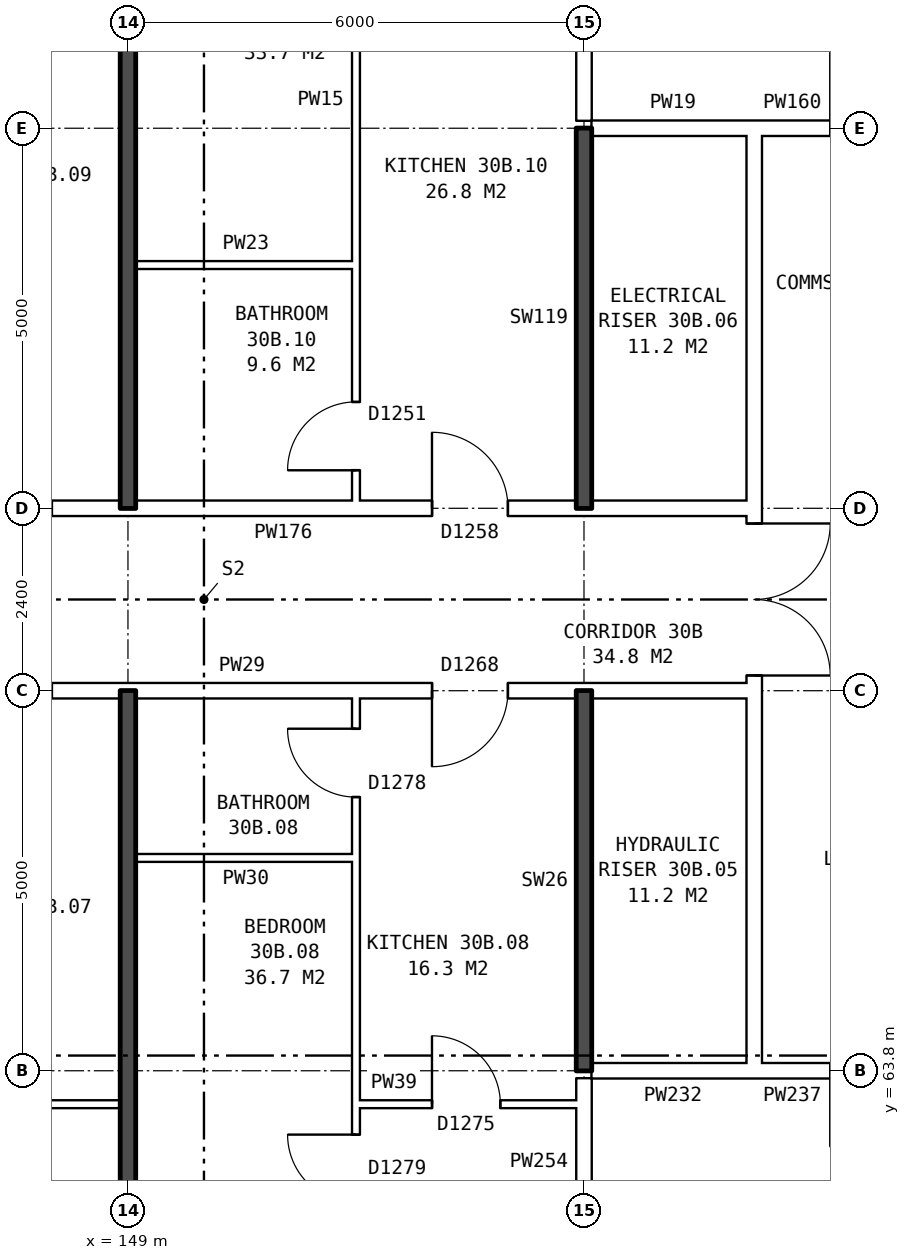
"""IFC4 building model, lengths in metres.
Left out: names, types, materials, properties, quantities, classifications, styles, units other than length and angle.
Written with IfcOpenShell. Run it as: python <this file> out.ifc"""

import sys

from ifc_helpers import new_model, si_unit, direction, frame, frame_2d, origin, place, context, subcontext, project, spatial, rectangle, extrude, element, fill, save


model = new_model("IFC4")
c1 = context("Model", 3, precision=1e-05, world=origin(), true_north=direction((0.0, 1.0)))
c2 = subcontext(c1, "Body", "Model", "MODEL_VIEW")
j1 = project(units=[si_unit("LENGTHUNIT", "METRE"), si_unit("PLANEANGLEUNIT", "RADIAN")], contexts=[c1])
p1 = place(None, origin())
s1 = spatial("IfcSite", under=j1, at=p1, CompositionType="ELEMENT")
p2 = place(p1, origin())
s2 = spatial("IfcBuilding", under=s1, at=p2, CompositionType="ELEMENT")
p3 = place(p2, frame((0.0, 0.0, 108.8)))
s3 = spatial("IfcBuildingStorey", under=s2, at=p3, CompositionType="ELEMENT", Elevation=108.8)
p4 = place(p3, frame((157.24, 63.9, 0.0), z_axis=(0.0, 0.0, 1.0), x_axis=(0.0, 1.0, 0.0)))
e1 = element("IfcWall", 1, at=p4, inside=s3, PredefinedType="PARTITIONING", context=c2, shape_type="SweptSolid", body=[
    extrude(rectangle(XDim=12.2, YDim=0.2, at=frame_2d((6.1, 0.0))), origin(), (0.0, 0.0, 1.0), 2.85),
])
p5 = place(p4, frame((5.1, 0.0, 0.0)))
e2 = element("IfcOpeningElement", 2, at=p5, cuts=e1, PredefinedType="OPENING", context=c2, shape_type="SweptSolid", body=[
    extrude(rectangle(XDim=2.0, YDim=2.1, at=frame_2d((1.0, 1.05))), frame((0.0, 0.11, 0.0), z_axis=(0.0, -1.0, 0.0), x_axis=(1.0, 0.0, 0.0)), (0.0, 0.0, 1.0), 0.22),
])
p6 = place(p3, frame((146.0, 63.36, 0.0), z_axis=(0.0, 0.0, 1.0), x_axis=(1.0, 0.0, 0.0)))
e3 = element("IfcWall", 3, at=p6, inside=s3, PredefinedType="PARTITIONING", context=c2, shape_type="SweptSolid", body=[
    extrude(rectangle(XDim=2.9, YDim=0.1, at=frame_2d((1.45, 0.0))), origin(), (0.0, 0.0, 1.0), 2.85),
])
p7 = place(p6, frame((1.0, 0.0, 0.0)))
e4 = element("IfcOpeningElement", 4, at=p7, cuts=e3, PredefinedType="OPENING", context=c2, shape_type="SweptSolid", body=[
    extrude(rectangle(XDim=0.9, YDim=2.1, at=frame_2d((0.45, 1.05))), frame((0.0, 0.06, 0.0), z_axis=(0.0, -1.0, 0.0), x_axis=(1.0, 0.0, 0.0)), (0.0, 0.0, 1.0), 0.12),
])
p8 = place(p3, frame((152.0, 63.36, 0.0), z_axis=(0.0, 0.0, 1.0), x_axis=(1.0, 0.0, 0.0)))
e5 = element("IfcWall", 5, at=p8, inside=s3, PredefinedType="PARTITIONING", context=c2, shape_type="SweptSolid", body=[
    extrude(rectangle(XDim=2.9, YDim=0.1, at=frame_2d((1.45, 0.0))), origin(), (0.0, 0.0, 1.0), 2.85),
])
p9 = place(p8, frame((1.0, 0.0, 0.0)))
e6 = element("IfcOpeningElement", 6, at=p9, cuts=e5, PredefinedType="OPENING", context=c2, shape_type="SweptSolid", body=[
    extrude(rectangle(XDim=0.9, YDim=2.1, at=frame_2d((0.45, 1.05))), frame((0.0, 0.06, 0.0), z_axis=(0.0, -1.0, 0.0), x_axis=(1.0, 0.0, 0.0)), (0.0, 0.0, 1.0), 0.12),
])
p10 = place(p3, frame((155.1, 63.8, 0.0), z_axis=(0.0, 0.0, 1.0), x_axis=(1.0, 0.0, 0.0)))
e7 = element("IfcWall", 7, at=p10, inside=s3, PredefinedType="PARTITIONING", context=c2, shape_type="SweptSolid", body=[
    extrude(rectangle(XDim=2.14, YDim=0.2, at=frame_2d((1.07, 0.0))), origin(), (0.0, 0.0, 1.0), 2.85),
])
p11 = place(p3, frame((157.24, 63.8, 0.0), z_axis=(0.0, 0.0, 1.0), x_axis=(1.0, 0.0, 0.0)))
e8 = element("IfcWall", 8, at=p11, inside=s3, PredefinedType="PARTITIONING", context=c2, shape_type="SweptSolid", body=[
    extrude(rectangle(XDim=3.0, YDim=0.2, at=frame_2d((1.5, 0.0))), origin(), (0.0, 0.0, 1.0), 2.85),
])
p12 = place(p11, frame((1.0, 0.0, 0.0)))
e9 = element("IfcOpeningElement", 9, at=p12, cuts=e8, PredefinedType="OPENING", context=c2, shape_type="SweptSolid", body=[
    extrude(rectangle(XDim=1.0, YDim=2.1, at=frame_2d((0.5, 1.05))), frame((0.0, 0.11, 0.0), z_axis=(0.0, -1.0, 0.0), x_axis=(1.0, 0.0, 0.0)), (0.0, 0.0, 1.0), 0.22),
])
p13 = place(p3, frame((149.1, 66.6, 0.0), z_axis=(0.0, 0.0, 1.0), x_axis=(1.0, 0.0, 0.0)))
e10 = element("IfcWall", 10, at=p13, inside=s3, PredefinedType="PARTITIONING", context=c2, shape_type="SweptSolid", body=[
    extrude(rectangle(XDim=2.9, YDim=0.1, at=frame_2d((1.45, 0.0))), origin(), (0.0, 0.0, 1.0), 2.85),
])
p14 = place(p3, frame((142.76, 68.8, 0.0), z_axis=(0.0, 0.0, 1.0), x_axis=(1.0, 0.0, 0.0)))
e11 = element("IfcWall", 11, at=p14, inside=s3, PredefinedType="PARTITIONING", context=c2, shape_type="SweptSolid", body=[
    extrude(rectangle(XDim=14.48, YDim=0.2, at=frame_2d((7.24, 0.0))), origin(), (0.0, 0.0, 1.0), 2.85),
])
p15 = place(p14, frame((4.24, 0.0, 0.0)))
e12 = element("IfcOpeningElement", 12, at=p15, cuts=e11, PredefinedType="OPENING", context=c2, shape_type="SweptSolid", body=[
    extrude(rectangle(XDim=1.0, YDim=2.1, at=frame_2d((0.5, 1.05))), frame((0.0, 0.11, 0.0), z_axis=(0.0, -1.0, 0.0), x_axis=(1.0, 0.0, 0.0)), (0.0, 0.0, 1.0), 0.22),
])
p16 = place(p14, frame((10.24, 0.0, 0.0)))
e13 = element("IfcOpeningElement", 13, at=p16, cuts=e11, PredefinedType="OPENING", context=c2, shape_type="SweptSolid", body=[
    extrude(rectangle(XDim=1.0, YDim=2.1, at=frame_2d((0.5, 1.05))), frame((0.0, 0.11, 0.0), z_axis=(0.0, -1.0, 0.0), x_axis=(1.0, 0.0, 0.0)), (0.0, 0.0, 1.0), 0.22),
])
p17 = place(p3, frame((142.76, 71.2, 0.0), z_axis=(0.0, 0.0, 1.0), x_axis=(1.0, 0.0, 0.0)))
e14 = element("IfcWall", 14, at=p17, inside=s3, PredefinedType="PARTITIONING", context=c2, shape_type="SweptSolid", body=[
    extrude(rectangle(XDim=14.48, YDim=0.2, at=frame_2d((7.24, 0.0))), origin(), (0.0, 0.0, 1.0), 2.85),
])
p18 = place(p17, frame((4.24, 0.0, 0.0)))
e15 = element("IfcOpeningElement", 15, at=p18, cuts=e14, PredefinedType="OPENING", context=c2, shape_type="SweptSolid", body=[
    extrude(rectangle(XDim=1.0, YDim=2.1, at=frame_2d((0.5, 1.05))), frame((0.0, 0.11, 0.0), z_axis=(0.0, -1.0, 0.0), x_axis=(1.0, 0.0, 0.0)), (0.0, 0.0, 1.0), 0.22),
])
p19 = place(p17, frame((10.24, 0.0, 0.0)))
e16 = element("IfcOpeningElement", 16, at=p19, cuts=e14, PredefinedType="OPENING", context=c2, shape_type="SweptSolid", body=[
    extrude(rectangle(XDim=1.0, YDim=2.1, at=frame_2d((0.5, 1.05))), frame((0.0, 0.11, 0.0), z_axis=(0.0, -1.0, 0.0), x_axis=(1.0, 0.0, 0.0)), (0.0, 0.0, 1.0), 0.22),
])
p20 = place(p3, frame((149.1, 74.4, 0.0), z_axis=(0.0, 0.0, 1.0), x_axis=(1.0, 0.0, 0.0)))
e17 = element("IfcWall", 17, at=p20, inside=s3, PredefinedType="PARTITIONING", context=c2, shape_type="SweptSolid", body=[
    extrude(rectangle(XDim=2.9, YDim=0.1, at=frame_2d((1.45, 0.0))), origin(), (0.0, 0.0, 1.0), 2.85),
])
p21 = place(p3, frame((155.1, 76.2, 0.0), z_axis=(0.0, 0.0, 1.0), x_axis=(1.0, 0.0, 0.0)))
e18 = element("IfcWall", 18, at=p21, inside=s3, PredefinedType="PARTITIONING", context=c2, shape_type="SweptSolid", body=[
    extrude(rectangle(XDim=2.14, YDim=0.2, at=frame_2d((1.07, 0.0))), origin(), (0.0, 0.0, 1.0), 2.85),
])
p22 = place(p3, frame((157.24, 76.2, 0.0), z_axis=(0.0, 0.0, 1.0), x_axis=(1.0, 0.0, 0.0)))
e19 = element("IfcWall", 19, at=p22, inside=s3, PredefinedType="PARTITIONING", context=c2, shape_type="SweptSolid", body=[
    extrude(rectangle(XDim=3.0, YDim=0.2, at=frame_2d((1.5, 0.0))), origin(), (0.0, 0.0, 1.0), 2.85),
])
p23 = place(p22, frame((1.0, 0.0, 0.0)))
e20 = element("IfcOpeningElement", 20, at=p23, cuts=e19, PredefinedType="OPENING", context=c2, shape_type="SweptSolid", body=[
    extrude(rectangle(XDim=1.0, YDim=2.1, at=frame_2d((0.5, 1.05))), frame((0.0, 0.11, 0.0), z_axis=(0.0, -1.0, 0.0), x_axis=(1.0, 0.0, 0.0)), (0.0, 0.0, 1.0), 0.22),
])
for number, where, z_axis, x_axis in (
    (21, (149.0, 54.36, 0.0), (0.0, 0.0, 1.0), (0.0, 1.0, 0.0)),
    (22, (149.0, 71.2, 0.0), (0.0, 0.0, 1.0), (0.0, 1.0, 0.0)),
):
    element("IfcWall", number, at=place(p3, frame(where, z_axis=z_axis, x_axis=x_axis)), inside=s3, PredefinedType="SOLIDWALL", context=c2, shape_type="SweptSolid", body=[
        extrude(rectangle(XDim=14.44, YDim=0.2, at=frame_2d((7.22, 0.0))), origin(), (0.0, 0.0, 1.0), 2.85),
    ])
p24 = place(p3, frame((152.0, 54.36, 0.0), z_axis=(0.0, 0.0, 1.0), x_axis=(0.0, 1.0, 0.0)))
e23 = element("IfcWall", 23, at=p24, inside=s3, PredefinedType="PARTITIONING", context=c2, shape_type="SweptSolid", body=[
    extrude(rectangle(XDim=14.34, YDim=0.1, at=frame_2d((7.17, 0.0))), origin(), (0.0, 0.0, 1.0), 2.85),
])
p25 = place(p24, frame((7.7, 0.0, 0.0)))
e24 = element("IfcOpeningElement", 24, at=p25, cuts=e23, PredefinedType="OPENING", context=c2, shape_type="SweptSolid", body=[
    extrude(rectangle(XDim=0.9, YDim=2.1, at=frame_2d((0.45, 1.05))), frame((0.0, 0.06, 0.0), z_axis=(0.0, -1.0, 0.0), x_axis=(1.0, 0.0, 0.0)), (0.0, 0.0, 1.0), 0.12),
])
p26 = place(p24, frame((13.04, 0.0, 0.0)))
e25 = element("IfcOpeningElement", 25, at=p26, cuts=e23, PredefinedType="OPENING", context=c2, shape_type="SweptSolid", body=[
    extrude(rectangle(XDim=0.9, YDim=2.1, at=frame_2d((0.45, 1.05))), frame((0.0, 0.06, 0.0), z_axis=(0.0, -1.0, 0.0), x_axis=(1.0, 0.0, 0.0)), (0.0, 0.0, 1.0), 0.12),
])
p27 = place(p3, frame((152.0, 71.3, 0.0), z_axis=(0.0, 0.0, 1.0), x_axis=(0.0, 1.0, 0.0)))
e26 = element("IfcWall", 26, at=p27, inside=s3, PredefinedType="PARTITIONING", context=c2, shape_type="SweptSolid", body=[
    extrude(rectangle(XDim=14.34, YDim=0.1, at=frame_2d((7.17, 0.0))), origin(), (0.0, 0.0, 1.0), 2.85),
])
p28 = place(p27, frame((9.24, 0.0, 0.0)))
e27 = element("IfcOpeningElement", 27, at=p28, cuts=e26, PredefinedType="OPENING", context=c2, shape_type="SweptSolid", body=[
    extrude(rectangle(XDim=0.9, YDim=2.1, at=frame_2d((0.45, 1.05))), frame((0.0, 0.06, 0.0), z_axis=(0.0, -1.0, 0.0), x_axis=(1.0, 0.0, 0.0)), (0.0, 0.0, 1.0), 0.12),
])
p29 = place(p27, frame((0.4, 0.0, 0.0)))
e28 = element("IfcOpeningElement", 28, at=p29, cuts=e26, PredefinedType="OPENING", context=c2, shape_type="SweptSolid", body=[
    extrude(rectangle(XDim=0.9, YDim=2.1, at=frame_2d((0.45, 1.05))), frame((0.0, 0.06, 0.0), z_axis=(0.0, -1.0, 0.0), x_axis=(1.0, 0.0, 0.0)), (0.0, 0.0, 1.0), 0.12),
])
p30 = place(p3, frame((155.0, 61.5, 0.0), z_axis=(0.0, 0.0, 1.0), x_axis=(0.0, 1.0, 0.0)))
e29 = element("IfcWall", 29, at=p30, inside=s3, PredefinedType="PARTITIONING", context=c2, shape_type="SweptSolid", body=[
    extrude(rectangle(XDim=2.2, YDim=0.2, at=frame_2d((1.1, 0.0))), origin(), (0.0, 0.0, 1.0), 2.85),
])
for number, where, z_axis, x_axis in (
    (30, (155.0, 63.8, 0.0), (0.0, 0.0, 1.0), (0.0, 1.0, 0.0)),
    (31, (155.0, 71.2, 0.0), (0.0, 0.0, 1.0), (0.0, 1.0, 0.0)),
):
    element("IfcWall", number, at=place(p3, frame(where, z_axis=z_axis, x_axis=x_axis)), inside=s3, PredefinedType="SOLIDWALL", context=c2, shape_type="SweptSolid", body=[
        extrude(rectangle(XDim=5.0, YDim=0.2, at=frame_2d((2.5, 0.0))), origin(), (0.0, 0.0, 1.0), 2.85),
    ])
p31 = place(p3, frame((155.0, 76.3, 0.0), z_axis=(0.0, 0.0, 1.0), x_axis=(0.0, 1.0, 0.0)))
e32 = element("IfcWall", 32, at=p31, inside=s3, PredefinedType="PARTITIONING", context=c2, shape_type="SweptSolid", body=[
    extrude(rectangle(XDim=2.2, YDim=0.2, at=frame_2d((1.1, 0.0))), origin(), (0.0, 0.0, 1.0), 2.85),
])
p32 = place(p5, frame((2.0, 0.0, 0.0), z_axis=(0.0, 0.0, 1.0), x_axis=(-1.0, 0.0, 0.0)))
e33 = element("IfcDoor", 33, at=p32, inside=s3, OperationType="DOUBLE_DOOR_SINGLE_SWING", PredefinedType="DOOR", context=c2, shape_type="SweptSolid", body=[
    extrude(rectangle(XDim=2.0, YDim=2.1, at=frame_2d((1.0, 1.05))), frame((0.0, 0.025, 0.0), z_axis=(0.0, -1.0, 0.0), x_axis=(1.0, 0.0, 0.0)), (0.0, 0.0, 1.0), 0.05),
])
fill(e2, e33)
p33 = place(p25, origin())
e34 = element("IfcDoor", 34, at=p33, inside=s3, OperationType="SINGLE_SWING_RIGHT", PredefinedType="DOOR", context=c2, shape_type="SweptSolid", body=[
    extrude(rectangle(XDim=0.9, YDim=2.1, at=frame_2d((0.45, 1.05))), frame((0.0, 0.025, 0.0), z_axis=(0.0, -1.0, 0.0), x_axis=(1.0, 0.0, 0.0)), (0.0, 0.0, 1.0), 0.05),
])
fill(e24, e34)
p34 = place(p16, frame((1.0, 0.0, 0.0), z_axis=(0.0, 0.0, 1.0), x_axis=(-1.0, 0.0, 0.0)))
e35 = element("IfcDoor", 35, at=p34, inside=s3, OperationType="SINGLE_SWING_RIGHT", PredefinedType="DOOR", context=c2, shape_type="SweptSolid", body=[
    extrude(rectangle(XDim=1.0, YDim=2.1, at=frame_2d((0.5, 1.05))), frame((0.0, 0.025, 0.0), z_axis=(0.0, -1.0, 0.0), x_axis=(1.0, 0.0, 0.0)), (0.0, 0.0, 1.0), 0.05),
])
fill(e13, e35)
p35 = place(p9, origin())
e36 = element("IfcDoor", 36, at=p35, inside=s3, OperationType="SINGLE_SWING_LEFT", PredefinedType="DOOR", context=c2, shape_type="SweptSolid", body=[
    extrude(rectangle(XDim=0.9, YDim=2.1, at=frame_2d((0.45, 1.05))), frame((0.0, 0.025, 0.0), z_axis=(0.0, -1.0, 0.0), x_axis=(1.0, 0.0, 0.0)), (0.0, 0.0, 1.0), 0.05),
])
fill(e6, e36)
p36 = place(p26, origin())
e37 = element("IfcDoor", 37, at=p36, inside=s3, OperationType="SINGLE_SWING_RIGHT", PredefinedType="DOOR", context=c2, shape_type="SweptSolid", body=[
    extrude(rectangle(XDim=0.9, YDim=2.1, at=frame_2d((0.45, 1.05))), frame((0.0, 0.025, 0.0), z_axis=(0.0, -1.0, 0.0), x_axis=(1.0, 0.0, 0.0)), (0.0, 0.0, 1.0), 0.05),
])
fill(e25, e37)
p37 = place(p19, origin())
e38 = element("IfcDoor", 38, at=p37, inside=s3, OperationType="SINGLE_SWING_LEFT", PredefinedType="DOOR", context=c2, shape_type="SweptSolid", body=[
    extrude(rectangle(XDim=1.0, YDim=2.1, at=frame_2d((0.5, 1.05))), frame((0.0, 0.025, 0.0), z_axis=(0.0, -1.0, 0.0), x_axis=(1.0, 0.0, 0.0)), (0.0, 0.0, 1.0), 0.05),
])
fill(e16, e38)
p38 = place(p29, origin())
e39 = element("IfcDoor", 39, at=p38, inside=s3, OperationType="SINGLE_SWING_LEFT", PredefinedType="DOOR", context=c2, shape_type="SweptSolid", body=[
    extrude(rectangle(XDim=0.9, YDim=2.1, at=frame_2d((0.45, 1.05))), frame((0.0, 0.025, 0.0), z_axis=(0.0, -1.0, 0.0), x_axis=(1.0, 0.0, 0.0)), (0.0, 0.0, 1.0), 0.05),
])
fill(e28, e39)
save(model, sys.argv[1])
